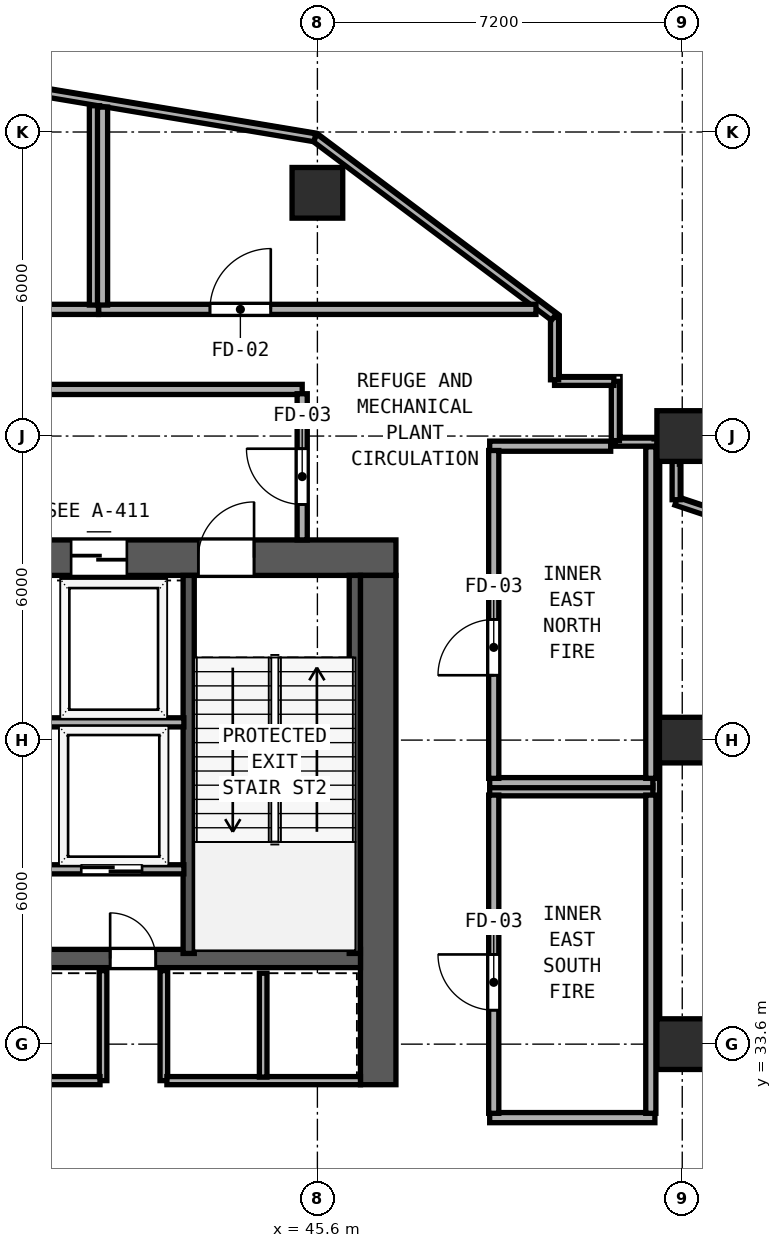
"""IFC4 building model, lengths in metres.
Left out: names, types, materials, properties, quantities, classifications, styles, units other than length and angle.
Written with IfcOpenShell. Run it as: python <this file> out.ifc"""

import sys

from ifc_helpers import new_model, si_unit, direction, frame, frame_2d, origin, origin_2d, place, context, subcontext, project, spatial, rectangle, hollow_rectangle, extrude, element, fill, save


model = new_model("IFC4")
c1 = context("Model", 3, precision=1e-05, world=origin(), true_north=direction((0.0, 1.0)))
c2 = subcontext(c1, "Body", "Model", "MODEL_VIEW")
j1 = project(units=[si_unit("LENGTHUNIT", "METRE"), si_unit("PLANEANGLEUNIT", "RADIAN")], contexts=[c1])
p1 = place(None, origin())
s1 = spatial("IfcSite", under=j1, at=p1, CompositionType="ELEMENT")
p2 = place(p1, origin())
s2 = spatial("IfcBuilding", under=s1, at=p2, CompositionType="ELEMENT")
p3 = place(p2, frame((0.0, 0.0, 160.0)))
s3 = spatial("IfcBuildingStorey", under=s2, at=p3, CompositionType="ELEMENT", Elevation=160.0)
p4 = place(p3, frame((29.65, 43.2, 0.0), z_axis=(0.0, 0.0, 1.0), x_axis=(1.0, 0.0, 0.0)))
e1 = element("IfcWall", 1, at=p4, inside=s3, PredefinedType="SHEAR", context=c2, shape_type="SweptSolid", body=[
    extrude(rectangle(XDim=17.5, YDim=0.7, at=frame_2d((8.75, 0.0))), origin(), (0.0, 0.0, 1.0), 4.35),
])
p5 = place(p4, frame((2.4, 0.0, 0.0)))
e2 = element("IfcOpeningElement", 2, at=p5, cuts=e1, PredefinedType="OPENING", context=c2, shape_type="SweptSolid", body=[
    extrude(rectangle(XDim=1.1, YDim=2.15, at=frame_2d((0.55, 1.075))), frame((0.0, 0.36, 0.0), z_axis=(0.0, -1.0, 0.0), x_axis=(1.0, 0.0, 0.0)), (0.0, 0.0, 1.0), 0.72),
])
p6 = place(p4, frame((7.51, 0.0, 0.0)))
e3 = element("IfcOpeningElement", 3, at=p6, cuts=e1, PredefinedType="OPENING", context=c2, shape_type="SweptSolid", body=[
    extrude(rectangle(XDim=1.1, YDim=2.15, at=frame_2d((0.55, 1.075))), frame((0.0, 0.36, 0.0), z_axis=(0.0, -1.0, 0.0), x_axis=(1.0, 0.0, 0.0)), (0.0, 0.0, 1.0), 0.72),
])
p7 = place(p4, frame((13.6, 0.0, 0.0)))
e4 = element("IfcOpeningElement", 4, at=p7, cuts=e1, PredefinedType="OPENING", context=c2, shape_type="SweptSolid", body=[
    extrude(rectangle(XDim=1.1, YDim=2.15, at=frame_2d((0.55, 1.075))), frame((0.0, 0.36, 0.0), z_axis=(0.0, -1.0, 0.0), x_axis=(1.0, 0.0, 0.0)), (0.0, 0.0, 1.0), 0.72),
])
p8 = place(p4, frame((4.73, 0.0, 0.0)))
e5 = element("IfcOpeningElement", 5, at=p8, cuts=e1, PredefinedType="OPENING", context=c2, shape_type="SweptSolid", body=[
    extrude(rectangle(XDim=1.1, YDim=2.2, at=frame_2d((0.55, 1.1))), frame((0.0, 0.36, 0.0), z_axis=(0.0, -1.0, 0.0), x_axis=(1.0, 0.0, 0.0)), (0.0, 0.0, 1.0), 0.72),
])
p9 = place(p4, frame((11.09, 0.0, 0.0)))
e6 = element("IfcOpeningElement", 6, at=p9, cuts=e1, PredefinedType="OPENING", context=c2, shape_type="SweptSolid", body=[
    extrude(rectangle(XDim=1.1, YDim=2.2, at=frame_2d((0.55, 1.1))), frame((0.0, 0.36, 0.0), z_axis=(0.0, -1.0, 0.0), x_axis=(1.0, 0.0, 0.0)), (0.0, 0.0, 1.0), 0.72),
])
p10 = place(p3, frame((46.8, 32.8, 0.0), z_axis=(0.0, 0.0, 1.0), x_axis=(0.0, 1.0, 0.0)))
e7 = element("IfcWall", 7, at=p10, inside=s3, PredefinedType="SHEAR", context=c2, shape_type="SweptSolid", body=[
    extrude(rectangle(XDim=10.05, YDim=0.7, at=frame_2d((5.025, 0.0))), origin(), (0.0, 0.0, 1.0), 4.35),
])
p11 = place(p3, frame((30.35, 35.29, 0.0), z_axis=(0.0, 0.0, 1.0), x_axis=(1.0, 0.0, 0.0)))
e8 = element("IfcWall", 8, at=p11, inside=s3, PredefinedType="SHEAR", context=c2, shape_type="SweptSolid", body=[
    extrude(rectangle(XDim=16.1, YDim=0.36, at=frame_2d((8.05, 0.0))), origin(), (0.0, 0.0, 1.0), 4.35),
])
p12 = place(p11, frame((5.0, 0.0, 0.0), z_axis=(0.0, 0.0, 1.0), x_axis=(-1.0, 0.0, 0.0)))
e9 = element("IfcOpeningElement", 9, at=p12, cuts=e8, PredefinedType="OPENING", context=c2, shape_type="SweptSolid", body=[
    extrude(rectangle(XDim=0.9, YDim=2.1, at=frame_2d((0.45, 1.05))), frame((0.0, 0.19, 0.0), z_axis=(0.0, -1.0, 0.0), x_axis=(1.0, 0.0, 0.0)), (0.0, 0.0, 1.0), 0.38),
])
p13 = place(p11, frame((12.06, 0.0, 0.0), z_axis=(0.0, 0.0, 1.0), x_axis=(-1.0, 0.0, 0.0)))
e10 = element("IfcOpeningElement", 10, at=p13, cuts=e8, PredefinedType="OPENING", context=c2, shape_type="SweptSolid", body=[
    extrude(rectangle(XDim=0.9, YDim=2.1, at=frame_2d((0.45, 1.05))), frame((0.0, 0.19, 0.0), z_axis=(0.0, -1.0, 0.0), x_axis=(1.0, 0.0, 0.0)), (0.0, 0.0, 1.0), 0.38),
])
for number, where, z_axis, x_axis in (
    (11, (43.06, 35.39, 0.0), (0.0, 0.0, 1.0), (0.0, 1.0, 0.0)),
    (12, (46.338, 35.39, 0.0), (0.0, 0.0, 1.0), (0.0, 1.0, 0.0)),
):
    element("IfcWall", number, at=place(p3, frame(where, z_axis=z_axis, x_axis=x_axis)), inside=s3, PredefinedType="SHEAR", context=c2, shape_type="SweptSolid", body=[
        extrude(rectangle(XDim=7.46, YDim=0.22, at=frame_2d((3.73, 0.0))), origin(), (0.0, 0.0, 1.0), 4.35),
    ])
for number, where, z_axis, x_axis in (
    (13, (52.8, 33.6, 0.0), (0.0, 0.0, 1.0), (1.0, 0.0, 0.0)),
    (14, (52.8, 45.6, 0.0), (0.0, 0.0, 1.0), (1.0, 0.0, 0.0)),
    (15, (45.6, 50.4, 0.0), (0.0, 0.0, 1.0), (1.0, 0.0, 0.0)),
):
    element("IfcColumn", number, at=place(p3, frame(where, z_axis=z_axis, x_axis=x_axis)), inside=s3, PredefinedType="COLUMN", context=c2, shape_type="SweptSolid", body=[
        extrude(hollow_rectangle(XDim=1.0, YDim=1.0, WallThickness=0.038, at=origin_2d()), origin(), (0.0, 0.0, 1.0), 4.6),
    ])
p14 = place(p3, frame((52.8, 39.6, 0.0), z_axis=(0.0, 0.0, 1.0), x_axis=(1.0, 0.0, 0.0)))
e16 = element("IfcColumn", 16, at=p14, inside=s3, PredefinedType="COLUMN", context=c2, shape_type="SweptSolid", body=[
    extrude(hollow_rectangle(XDim=0.9, YDim=0.9, WallThickness=0.034, at=origin_2d()), origin(), (0.0, 0.0, 1.0), 4.6),
])
p15 = place(p3, frame((58.295, 42.442, 0.0), z_axis=(0.0, 0.0, 1.0), x_axis=(-0.948683298051, 0.316227766017, 0.0)))
e17 = element("IfcWall", 17, at=p15, inside=s3, PredefinedType="PARAPET", context=c2, shape_type="SweptSolid", body=[
    extrude(rectangle(XDim=5.918, YDim=0.16, at=frame_2d((2.959, 0.0))), origin(), (0.0, 0.0, 1.0), 1.15),
])
p16 = place(p3, frame((52.68, 44.344, 0.0), z_axis=(0.0, 0.0, 1.0), x_axis=(0.0, 1.0, 0.0)))
e18 = element("IfcWall", 18, at=p16, inside=s3, PredefinedType="PARAPET", context=c2, shape_type="SweptSolid", body=[
    extrude(rectangle(XDim=0.764, YDim=0.16, at=frame_2d((0.382, 0.0))), origin(), (0.0, 0.0, 1.0), 1.15),
])
p17 = place(p3, frame((52.308, 45.48, 0.0), z_axis=(0.0, 0.0, 1.0), x_axis=(-1.0, 0.0, 0.0)))
e19 = element("IfcWall", 19, at=p17, inside=s3, PredefinedType="PARAPET", context=c2, shape_type="SweptSolid", body=[
    extrude(rectangle(XDim=0.828, YDim=0.16, at=frame_2d((0.414, 0.0))), origin(), (0.0, 0.0, 1.0), 1.15),
])
for number, where, z_axis, x_axis in (
    (20, (51.48, 45.51, 0.0), (0.0, 0.0, 1.0), (0.0, 1.0, 0.0)),
    (21, (51.45, 46.68, 0.0), (0.0, 0.0, 1.0), (-1.0, 0.0, 0.0)),
):
    element("IfcWall", number, at=place(p3, frame(where, z_axis=z_axis, x_axis=x_axis)), inside=s3, PredefinedType="PARAPET", context=c2, shape_type="SweptSolid", body=[
        extrude(rectangle(XDim=1.17, YDim=0.16, at=frame_2d((0.585, 0.0))), origin(), (0.0, 0.0, 1.0), 1.15),
    ])
p18 = place(p3, frame((50.28, 46.71, 0.0), z_axis=(0.0, 0.0, 1.0), x_axis=(0.0, 1.0, 0.0)))
e22 = element("IfcWall", 22, at=p18, inside=s3, PredefinedType="PARAPET", context=c2, shape_type="SweptSolid", body=[
    extrude(rectangle(XDim=1.23, YDim=0.16, at=frame_2d((0.615, 0.0))), origin(), (0.0, 0.0, 1.0), 1.15),
])
p19 = place(p3, frame((50.268, 47.949, 0.0), z_axis=(0.0, 0.0, 1.0), x_axis=(-0.800004969205, 0.599993374337, 0.0)))
e23 = element("IfcWall", 23, at=p19, inside=s3, PredefinedType="PARAPET", context=c2, shape_type="SweptSolid", body=[
    extrude(rectangle(XDim=5.896, YDim=0.16, at=frame_2d((2.948, 0.0))), origin(), (0.0, 0.0, 1.0), 1.15),
])
p20 = place(p3, frame((45.552, 51.486, 0.0), z_axis=(0.0, 0.0, 1.0), x_axis=(-0.986394833909, 0.164393526752, 0.0)))
e24 = element("IfcWall", 24, at=p20, inside=s3, PredefinedType="PARAPET", context=c2, shape_type="SweptSolid", body=[
    extrude(rectangle(XDim=7.25, YDim=0.16, at=frame_2d((3.625, 0.0))), origin(), (0.0, 0.0, 1.0), 1.15),
])
p21 = place(p3, frame((31.5, 46.52, 0.0), z_axis=(0.0, 0.0, 1.0), x_axis=(1.0, 0.0, 0.0)))
e25 = element("IfcWall", 25, at=p21, inside=s3, PredefinedType="SOLIDWALL", context=c2, shape_type="SweptSolid", body=[
    extrude(rectangle(XDim=13.8, YDim=0.2, at=frame_2d((6.9, 0.0))), origin(), (0.0, 0.0, 1.0), 4.35),
])
p22 = place(p3, frame((45.3, 43.55, 0.0), z_axis=(0.0, 0.0, 1.0), x_axis=(0.0, 1.0, 0.0)))
e26 = element("IfcWall", 26, at=p22, inside=s3, PredefinedType="SOLIDWALL", context=c2, shape_type="SweptSolid", body=[
    extrude(rectangle(XDim=2.885, YDim=0.2, at=frame_2d((1.442, 0.0))), origin(), (0.0, 0.0, 1.0), 4.35),
])
p23 = place(p22, frame((0.7, 0.0, 0.0)))
e27 = element("IfcOpeningElement", 27, at=p23, cuts=e26, PredefinedType="OPENING", context=c2, shape_type="SweptSolid", body=[
    extrude(rectangle(XDim=1.1, YDim=2.15, at=frame_2d((0.55, 1.075))), frame((0.0, 0.11, 0.0), z_axis=(0.0, -1.0, 0.0), x_axis=(1.0, 0.0, 0.0)), (0.0, 0.0, 1.0), 0.22),
])
p24 = place(p3, frame((40.195, 39.95, 0.0), z_axis=(0.0, 0.0, 1.0), x_axis=(1.0, 0.0, 0.0)))
e28 = element("IfcWall", 28, at=p24, inside=s3, PredefinedType="SOLIDWALL", context=c2, shape_type="SweptSolid", body=[
    extrude(rectangle(XDim=2.77, YDim=0.18, at=frame_2d((1.385, 0.0))), origin(), (0.0, 0.0, 1.0), 4.35),
])
p25 = place(p3, frame((40.195, 37.05, 0.0), z_axis=(0.0, 0.0, 1.0), x_axis=(1.0, 0.0, 0.0)))
e29 = element("IfcWall", 29, at=p25, inside=s3, PredefinedType="SOLIDWALL", context=c2, shape_type="SweptSolid", body=[
    extrude(rectangle(XDim=2.77, YDim=0.18, at=frame_2d((1.385, 0.0))), origin(), (0.0, 0.0, 1.0), 4.35),
])
p26 = place(p25, frame((1.945, 0.0, 0.0), z_axis=(0.0, 0.0, 1.0), x_axis=(-1.0, 0.0, 0.0)))
e30 = element("IfcOpeningElement", 30, at=p26, cuts=e29, PredefinedType="OPENING", context=c2, shape_type="SweptSolid", body=[
    extrude(rectangle(XDim=1.2, YDim=2.2, at=frame_2d((0.6, 1.1))), frame((0.0, 0.1, 0.0), z_axis=(0.0, -1.0, 0.0), x_axis=(1.0, 0.0, 0.0)), (0.0, 0.0, 1.0), 0.2),
])
for number, where, z_axis, x_axis in (
    (31, (41.37, 32.88, 0.0), (0.0, 0.0, 1.0), (0.0, 1.0, 0.0)),
    (32, (42.57, 32.88, 0.0), (0.0, 0.0, 1.0), (0.0, 1.0, 0.0)),
):
    element("IfcWall", number, at=place(p3, frame(where, z_axis=z_axis, x_axis=x_axis)), inside=s3, PredefinedType="SOLIDWALL", context=c2, shape_type="SweptSolid", body=[
        extrude(rectangle(XDim=2.17, YDim=0.15, at=frame_2d((1.085, 0.0))), origin(), (0.0, 0.0, 1.0), 4.35),
    ])
p27 = place(p3, frame((35.57, 32.88, 0.0), z_axis=(0.0, 0.0, 1.0), x_axis=(1.0, 0.0, 0.0)))
e33 = element("IfcWall", 33, at=p27, inside=s3, PredefinedType="SOLIDWALL", context=c2, shape_type="SweptSolid", body=[
    extrude(rectangle(XDim=5.74, YDim=0.16, at=frame_2d((2.87, 0.0))), origin(), (0.0, 0.0, 1.0), 4.35),
])
p28 = place(p27, frame((1.49, 0.0, 0.0), z_axis=(0.0, 0.0, 1.0), x_axis=(-1.0, 0.0, 0.0)))
e34 = element("IfcOpeningElement", 34, at=p28, cuts=e33, PredefinedType="OPENING", context=c2, shape_type="SweptSolid", body=[
    extrude(rectangle(XDim=0.95, YDim=2.12, at=frame_2d((0.475, 1.06))), frame((0.0, 0.09, 0.0), z_axis=(0.0, -1.0, 0.0), x_axis=(1.0, 0.0, 0.0)), (0.0, 0.0, 1.0), 0.18),
])
p29 = place(p3, frame((42.63, 32.88, 0.0), z_axis=(0.0, 0.0, 1.0), x_axis=(1.0, 0.0, 0.0)))
e35 = element("IfcWall", 35, at=p29, inside=s3, PredefinedType="SOLIDWALL", context=c2, shape_type="SweptSolid", body=[
    extrude(rectangle(XDim=3.82, YDim=0.16, at=frame_2d((1.91, 0.0))), origin(), (0.0, 0.0, 1.0), 4.35),
])
p30 = place(p3, frame((44.53, 32.95, 0.0), z_axis=(0.0, 0.0, 1.0), x_axis=(0.0, 1.0, 0.0)))
e36 = element("IfcWall", 36, at=p30, inside=s3, PredefinedType="SOLIDWALL", context=c2, shape_type="SweptSolid", body=[
    extrude(rectangle(XDim=2.05, YDim=0.15, at=frame_2d((1.025, 0.0))), origin(), (0.0, 0.0, 1.0), 4.35),
])
p31 = place(p3, frame((52.28, 33.6, 0.0), z_axis=(0.0, 0.0, 1.0), x_axis=(0.0, 1.0, 0.0)))
e37 = element("IfcWall", 37, at=p31, inside=s3, PredefinedType="PARTITIONING", context=c2, shape_type="SweptSolid", body=[
    extrude(rectangle(XDim=11.788, YDim=0.15, at=frame_2d((5.894, 0.0))), origin(), (0.0, 0.0, 1.0), 4.35),
])
p32 = place(p3, frame((49.0, 38.6, 0.0), z_axis=(0.0, 0.0, 1.0), x_axis=(1.0, 0.0, 0.0)))
e38 = element("IfcWall", 38, at=p32, inside=s3, PredefinedType="SOLIDWALL", context=c2, shape_type="SweptSolid", body=[
    extrude(rectangle(XDim=3.22, YDim=0.2, at=frame_2d((1.61, 0.0))), origin(), (0.0, 0.0, 1.0), 4.35),
])
p33 = place(p3, frame((49.0, 32.15, 0.0), z_axis=(0.0, 0.0, 1.0), x_axis=(1.0, 0.0, 0.0)))
e39 = element("IfcWall", 39, at=p33, inside=s3, PredefinedType="SOLIDWALL", context=c2, shape_type="SweptSolid", body=[
    extrude(rectangle(XDim=3.26, YDim=0.2, at=frame_2d((1.63, 0.0))), origin(), (0.0, 0.0, 1.0), 4.35),
])
p34 = place(p3, frame((49.08, 32.235, 0.0), z_axis=(0.0, 0.0, 1.0), x_axis=(0.0, 1.0, 0.0)))
e40 = element("IfcWall", 40, at=p34, inside=s3, PredefinedType="SOLIDWALL", context=c2, shape_type="SweptSolid", body=[
    extrude(rectangle(XDim=6.28, YDim=0.2, at=frame_2d((3.14, 0.0))), origin(), (0.0, 0.0, 1.0), 4.35),
])
p35 = place(p34, frame((2.035, 0.0, 0.0)))
e41 = element("IfcOpeningElement", 41, at=p35, cuts=e40, PredefinedType="OPENING", context=c2, shape_type="SweptSolid", body=[
    extrude(rectangle(XDim=1.1, YDim=2.15, at=frame_2d((0.55, 1.075))), frame((0.0, 0.11, 0.0), z_axis=(0.0, -1.0, 0.0), x_axis=(1.0, 0.0, 0.0)), (0.0, 0.0, 1.0), 0.22),
])
p36 = place(p3, frame((52.18, 32.235, 0.0), z_axis=(0.0, 0.0, 1.0), x_axis=(0.0, 1.0, 0.0)))
e42 = element("IfcWall", 42, at=p36, inside=s3, PredefinedType="SOLIDWALL", context=c2, shape_type="SweptSolid", body=[
    extrude(rectangle(XDim=6.28, YDim=0.2, at=frame_2d((3.14, 0.0))), origin(), (0.0, 0.0, 1.0), 4.35),
])
p37 = place(p3, frame((49.0, 45.4, 0.0), z_axis=(0.0, 0.0, 1.0), x_axis=(1.0, 0.0, 0.0)))
e43 = element("IfcWall", 43, at=p37, inside=s3, PredefinedType="SOLIDWALL", context=c2, shape_type="SweptSolid", body=[
    extrude(rectangle(XDim=2.388, YDim=0.2, at=frame_2d((1.194, 0.0))), origin(), (0.0, 0.0, 1.0), 4.35),
])
p38 = place(p3, frame((49.0, 38.76, 0.0), z_axis=(0.0, 0.0, 1.0), x_axis=(1.0, 0.0, 0.0)))
e44 = element("IfcWall", 44, at=p38, inside=s3, PredefinedType="SOLIDWALL", context=c2, shape_type="SweptSolid", body=[
    extrude(rectangle(XDim=3.22, YDim=0.2, at=frame_2d((1.61, 0.0))), origin(), (0.0, 0.0, 1.0), 4.35),
])
p39 = place(p3, frame((49.08, 38.845, 0.0), z_axis=(0.0, 0.0, 1.0), x_axis=(0.0, 1.0, 0.0)))
e45 = element("IfcWall", 45, at=p39, inside=s3, PredefinedType="SOLIDWALL", context=c2, shape_type="SweptSolid", body=[
    extrude(rectangle(XDim=6.47, YDim=0.2, at=frame_2d((3.235, 0.0))), origin(), (0.0, 0.0, 1.0), 4.35),
])
p40 = place(p39, frame((2.035, 0.0, 0.0)))
e46 = element("IfcOpeningElement", 46, at=p40, cuts=e45, PredefinedType="OPENING", context=c2, shape_type="SweptSolid", body=[
    extrude(rectangle(XDim=1.1, YDim=2.15, at=frame_2d((0.55, 1.075))), frame((0.0, 0.11, 0.0), z_axis=(0.0, -1.0, 0.0), x_axis=(1.0, 0.0, 0.0)), (0.0, 0.0, 1.0), 0.22),
])
p41 = place(p3, frame((52.18, 38.845, 0.0), z_axis=(0.0, 0.0, 1.0), x_axis=(0.0, 1.0, 0.0)))
e47 = element("IfcWall", 47, at=p41, inside=s3, PredefinedType="SOLIDWALL", context=c2, shape_type="SweptSolid", body=[
    extrude(rectangle(XDim=6.543, YDim=0.2, at=frame_2d((3.271, 0.0))), origin(), (0.0, 0.0, 1.0), 4.35),
])
p42 = place(p3, frame((26.887, 48.1, 0.0), z_axis=(0.0, 0.0, 1.0), x_axis=(1.0, 0.0, 0.0)))
e48 = element("IfcWall", 48, at=p42, inside=s3, PredefinedType="SOLIDWALL", context=c2, shape_type="SweptSolid", body=[
    extrude(rectangle(XDim=14.393, YDim=0.2, at=frame_2d((7.197, 0.0))), origin(), (0.0, 0.0, 1.0), 4.35),
])
p43 = place(p42, frame((4.063, 0.0, 0.0)))
e49 = element("IfcOpeningElement", 49, at=p43, cuts=e48, PredefinedType="OPENING", context=c2, shape_type="SweptSolid", body=[
    extrude(rectangle(XDim=1.2, YDim=2.15, at=frame_2d((0.6, 1.075))), frame((0.0, 0.11, 0.0), z_axis=(0.0, -1.0, 0.0), x_axis=(1.0, 0.0, 0.0)), (0.0, 0.0, 1.0), 0.22),
])
p44 = place(p3, frame((41.2, 48.185, 0.0), z_axis=(0.0, 0.0, 1.0), x_axis=(0.0, 1.0, 0.0)))
e50 = element("IfcWall", 50, at=p44, inside=s3, PredefinedType="SOLIDWALL", context=c2, shape_type="SweptSolid", body=[
    extrude(rectangle(XDim=3.933, YDim=0.2, at=frame_2d((1.967, 0.0))), origin(), (0.0, 0.0, 1.0), 4.35),
])
p45 = place(p3, frame((41.285, 48.1, 0.0), z_axis=(0.0, 0.0, 1.0), x_axis=(1.0, 0.0, 0.0)))
e51 = element("IfcWall", 51, at=p45, inside=s3, PredefinedType="SOLIDWALL", context=c2, shape_type="SweptSolid", body=[
    extrude(rectangle(XDim=8.628, YDim=0.2, at=frame_2d((4.314, 0.0))), origin(), (0.0, 0.0, 1.0), 4.35),
])
p46 = place(p45, frame((2.195, 0.0, 0.0)))
e52 = element("IfcOpeningElement", 52, at=p46, cuts=e51, PredefinedType="OPENING", context=c2, shape_type="SweptSolid", body=[
    extrude(rectangle(XDim=1.2, YDim=2.15, at=frame_2d((0.6, 1.075))), frame((0.0, 0.11, 0.0), z_axis=(0.0, -1.0, 0.0), x_axis=(1.0, 0.0, 0.0)), (0.0, 0.0, 1.0), 0.22),
])
p47 = place(p3, frame((41.36, 48.185, 0.0), z_axis=(0.0, 0.0, 1.0), x_axis=(0.0, 1.0, 0.0)))
e53 = element("IfcWall", 53, at=p47, inside=s3, PredefinedType="SOLIDWALL", context=c2, shape_type="SweptSolid", body=[
    extrude(rectangle(XDim=3.907, YDim=0.2, at=frame_2d((1.953, 0.0))), origin(), (0.0, 0.0, 1.0), 4.35),
])
p48 = place(p7, origin())
e54 = element("IfcDoor", 54, at=p48, inside=s3, OperationType="SINGLE_SWING_RIGHT", PredefinedType="DOOR", context=c2, shape_type="SweptSolid", body=[
    extrude(rectangle(XDim=1.1, YDim=2.15, at=frame_2d((0.55, 1.075))), frame((0.0, 0.185, 0.0), z_axis=(0.0, -1.0, 0.0), x_axis=(1.0, 0.0, 0.0)), (0.0, 0.0, 1.0), 0.05),
])
fill(e4, e54)
p49 = place(p23, origin())
e55 = element("IfcDoor", 55, at=p49, inside=s3, OperationType="SINGLE_SWING_RIGHT", PredefinedType="DOOR", context=c2, shape_type="SweptSolid", body=[
    extrude(rectangle(XDim=1.1, YDim=2.15, at=frame_2d((0.55, 1.075))), frame((0.0, 0.025, 0.0), z_axis=(0.0, -1.0, 0.0), x_axis=(1.0, 0.0, 0.0)), (0.0, 0.0, 1.0), 0.05),
])
fill(e27, e55)
p50 = place(p9, origin())
e56 = element("IfcDoor", 56, at=p50, inside=s3, OperationType="SLIDING_TO_LEFT", PredefinedType="DOOR", context=c2, shape_type="SweptSolid", body=[
    extrude(rectangle(XDim=1.1, YDim=2.2, at=frame_2d((0.55, 1.1))), frame((0.0, 0.185, 0.0), z_axis=(0.0, -1.0, 0.0), x_axis=(1.0, 0.0, 0.0)), (0.0, 0.0, 1.0), 0.05),
])
fill(e6, e56)
p51 = place(p26, origin())
e57 = element("IfcDoor", 57, at=p51, inside=s3, OperationType="SLIDING_TO_RIGHT", PredefinedType="DOOR", context=c2, shape_type="SweptSolid", body=[
    extrude(rectangle(XDim=1.2, YDim=2.2, at=frame_2d((0.6, 1.1))), frame((0.0, 0.025, 0.0), z_axis=(0.0, -1.0, 0.0), x_axis=(1.0, 0.0, 0.0)), (0.0, 0.0, 1.0), 0.05),
])
fill(e30, e57)
p52 = place(p13, origin())
e58 = element("IfcDoor", 58, at=p52, inside=s3, OperationType="SINGLE_SWING_RIGHT", PredefinedType="DOOR", context=c2, shape_type="SweptSolid", body=[
    extrude(rectangle(XDim=0.9, YDim=2.1, at=frame_2d((0.45, 1.05))), frame((0.0, 0.025, 0.0), z_axis=(0.0, -1.0, 0.0), x_axis=(1.0, 0.0, 0.0)), (0.0, 0.0, 1.0), 0.05),
])
fill(e10, e58)
p53 = place(p35, origin())
e59 = element("IfcDoor", 59, at=p53, inside=s3, OperationType="SINGLE_SWING_RIGHT", PredefinedType="DOOR", context=c2, shape_type="SweptSolid", body=[
    extrude(rectangle(XDim=1.1, YDim=2.15, at=frame_2d((0.55, 1.075))), frame((0.0, 0.025, 0.0), z_axis=(0.0, -1.0, 0.0), x_axis=(1.0, 0.0, 0.0)), (0.0, 0.0, 1.0), 0.05),
])
fill(e41, e59)
p54 = place(p40, origin())
e60 = element("IfcDoor", 60, at=p54, inside=s3, OperationType="SINGLE_SWING_LEFT", PredefinedType="DOOR", context=c2, shape_type="SweptSolid", body=[
    extrude(rectangle(XDim=1.1, YDim=2.15, at=frame_2d((0.55, 1.075))), frame((0.0, 0.025, 0.0), z_axis=(0.0, -1.0, 0.0), x_axis=(1.0, 0.0, 0.0)), (0.0, 0.0, 1.0), 0.05),
])
fill(e46, e60)
p55 = place(p46, origin())
e61 = element("IfcDoor", 61, at=p55, inside=s3, OperationType="SINGLE_SWING_RIGHT", PredefinedType="DOOR", context=c2, shape_type="SweptSolid", body=[
    extrude(rectangle(XDim=1.2, YDim=2.15, at=frame_2d((0.6, 1.075))), frame((0.0, 0.025, 0.0), z_axis=(0.0, -1.0, 0.0), x_axis=(1.0, 0.0, 0.0)), (0.0, 0.0, 1.0), 0.05),
])
fill(e52, e61)
save(model, sys.argv[1])
